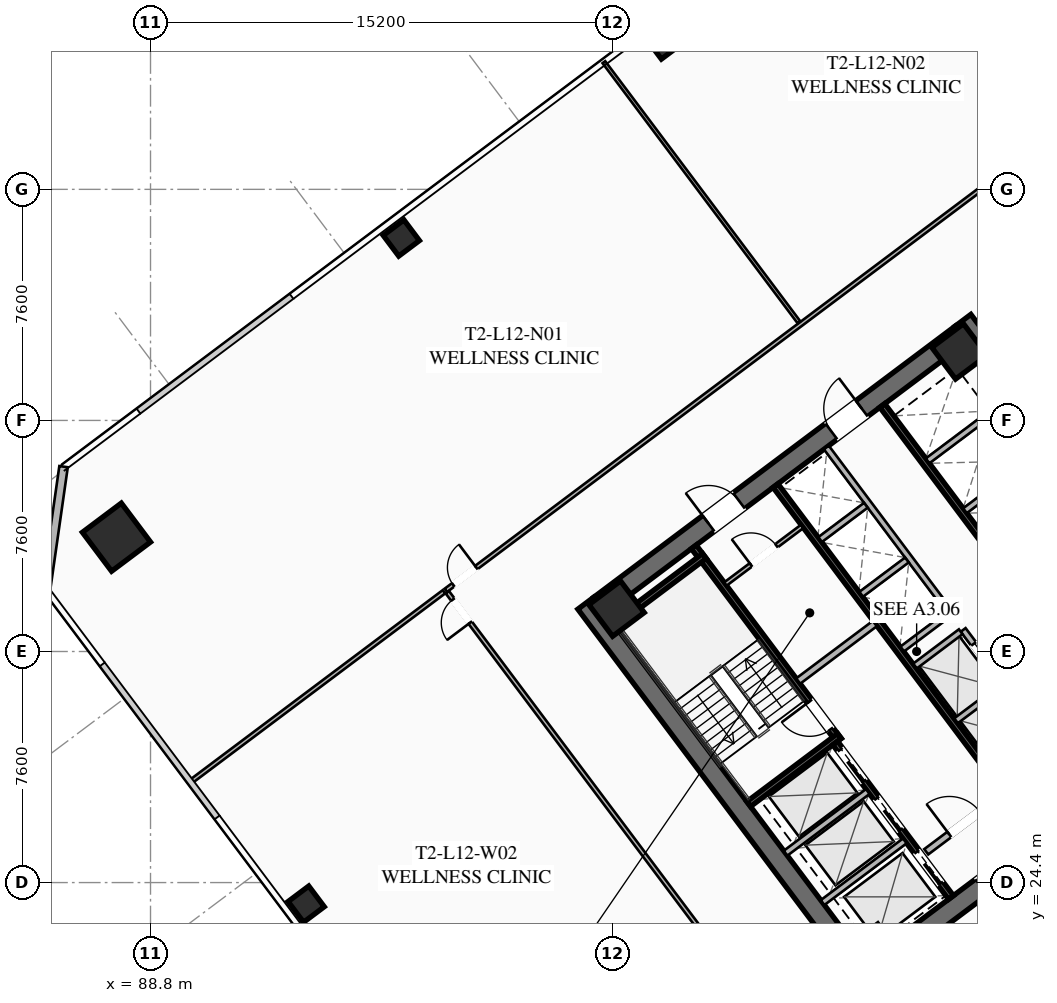
"""IFC4 building model, lengths in metres.
Left out: names, types, materials, properties, quantities, classifications, styles, units other than length and angle.
Written with IfcOpenShell. Run it as: python <this file> out.ifc"""

import sys

from ifc_helpers import new_model, si_unit, direction, frame, frame_2d, origin, origin_2d, place, context, subcontext, project, spatial, rectangle, hollow_rectangle, extrude, element, fill, save


model = new_model("IFC4")
c1 = context("Model", 3, precision=1e-05, world=origin(), true_north=direction((0.0, 1.0)))
c2 = subcontext(c1, "Body", "Model", "MODEL_VIEW")
j1 = project(units=[si_unit("LENGTHUNIT", "METRE"), si_unit("PLANEANGLEUNIT", "RADIAN")], contexts=[c1])
p1 = place(None, origin())
s1 = spatial("IfcSite", under=j1, at=p1, CompositionType="ELEMENT")
p2 = place(p1, origin())
s2 = spatial("IfcBuilding", under=s1, at=p2, CompositionType="ELEMENT")
p3 = place(p2, frame((0.0, 0.0, 49.45)))
s3 = spatial("IfcBuildingStorey", under=s2, at=p3, CompositionType="ELEMENT", Elevation=49.45)
for number, where, z_axis, x_axis in (
    (1, (112.476, 21.107, 0.0), (0.0, 0.0, 1.0), (-0.6, 0.8, 0.0)),
    (2, (115.524, 42.893, 0.0), (0.0, 0.0, 1.0), (0.6, -0.8, 0.0)),
):
    element("IfcWall", number, at=place(p3, frame(where, z_axis=z_axis, x_axis=x_axis)), inside=s3, PredefinedType="SHEAR", context=c2, shape_type="SweptSolid", body=[
        extrude(rectangle(XDim=15.6, YDim=0.65, at=frame_2d((7.8, 0.0))), origin(), (0.0, 0.0, 1.0), 3.55),
    ])
p4 = place(p3, frame((124.429, 30.478, 0.0), z_axis=(0.0, 0.0, 1.0), x_axis=(-0.799998028465, -0.600002628705, 0.0)))
e3 = element("IfcWall", 3, at=p4, inside=s3, PredefinedType="SHEAR", context=c2, shape_type="SweptSolid", body=[
    extrude(rectangle(XDim=14.86, YDim=0.65, at=frame_2d((7.43, 0.0))), origin(), (0.0, 0.0, 1.0), 3.55),
])
p5 = place(p4, frame((9.13, 0.0, 0.0)))
e4 = element("IfcOpeningElement", 4, at=p5, cuts=e3, PredefinedType="OPENING", context=c2, shape_type="SweptSolid", body=[
    extrude(rectangle(XDim=1.25, YDim=2.25, at=frame_2d((0.625, 1.125))), frame((0.0, 0.335, 0.0), z_axis=(0.0, -1.0, 0.0), x_axis=(1.0, 0.0, 0.0)), (0.0, 0.0, 1.0), 0.67),
])
p6 = place(p4, frame((4.08, 0.0, 0.0)))
e5 = element("IfcOpeningElement", 5, at=p6, cuts=e3, PredefinedType="OPENING", context=c2, shape_type="SweptSolid", body=[
    extrude(rectangle(XDim=1.25, YDim=2.25, at=frame_2d((0.625, 1.125))), frame((0.0, 0.335, 0.0), z_axis=(0.0, -1.0, 0.0), x_axis=(1.0, 0.0, 0.0)), (0.0, 0.0, 1.0), 0.67),
])
p7 = place(p3, frame((103.571, 33.522, 0.0), z_axis=(0.0, 0.0, 1.0), x_axis=(0.799998028465, 0.600002628705, 0.0)))
e6 = element("IfcWall", 6, at=p7, inside=s3, PredefinedType="SHEAR", context=c2, shape_type="SweptSolid", body=[
    extrude(rectangle(XDim=14.86, YDim=0.65, at=frame_2d((7.43, 0.0))), origin(), (0.0, 0.0, 1.0), 3.55),
])
p8 = place(p7, frame((4.48, 0.0, 0.0)))
e7 = element("IfcOpeningElement", 7, at=p8, cuts=e6, PredefinedType="OPENING", context=c2, shape_type="SweptSolid", body=[
    extrude(rectangle(XDim=1.25, YDim=2.25, at=frame_2d((0.625, 1.125))), frame((0.0, 0.335, 0.0), z_axis=(0.0, -1.0, 0.0), x_axis=(1.0, 0.0, 0.0)), (0.0, 0.0, 1.0), 0.67),
])
p9 = place(p7, frame((9.53, 0.0, 0.0)))
e8 = element("IfcOpeningElement", 8, at=p9, cuts=e6, PredefinedType="OPENING", context=c2, shape_type="SweptSolid", body=[
    extrude(rectangle(XDim=1.25, YDim=2.25, at=frame_2d((0.625, 1.125))), frame((0.0, 0.335, 0.0), z_axis=(0.0, -1.0, 0.0), x_axis=(1.0, 0.0, 0.0)), (0.0, 0.0, 1.0), 0.67),
])
for number, where, z_axis, x_axis in (
    (9, (115.41, 41.87, 0.0), (0.0, 0.0, 1.0), (0.8, 0.6, 0.0)),
    (10, (104.13, 33.41, 0.0), (0.0, 0.0, 1.0), (0.8, 0.6, 0.0)),
):
    element("IfcColumn", number, at=place(p3, frame(where, z_axis=z_axis, x_axis=x_axis)), inside=s3, PredefinedType="COLUMN", context=c2, shape_type="SweptSolid", body=[
        extrude(hollow_rectangle(XDim=1.3, YDim=1.3, WallThickness=0.05, at=origin_2d()), origin(), (0.0, 0.0, 1.0), 3.35),
    ])
p10 = place(p3, frame((87.68, 35.76, 0.0), z_axis=(0.0, 0.0, 1.0), x_axis=(0.799999996291, 0.600000004945, 0.0)))
e11 = element("IfcColumn", 11, at=p10, inside=s3, PredefinedType="COLUMN", context=c2, shape_type="SweptSolid", body=[
    extrude(hollow_rectangle(XDim=1.6, YDim=1.6, WallThickness=0.06, at=origin_2d()), origin(), (0.0, 0.0, 1.0), 3.35),
])
for number, where, z_axis, x_axis in (
    (12, (105.69, 52.08, 0.0), (0.0, 0.0, 1.0), (0.8, 0.6, 0.0)),
    (13, (97.05, 45.6, 0.0), (0.0, 0.0, 1.0), (0.8, 0.6, 0.0)),
    (14, (93.92, 23.69, 0.0), (0.0, 0.0, 1.0), (0.8, 0.6, 0.0)),
):
    element("IfcColumn", number, at=place(p3, frame(where, z_axis=z_axis, x_axis=x_axis)), inside=s3, PredefinedType="COLUMN", context=c2, shape_type="SweptSolid", body=[
        extrude(hollow_rectangle(XDim=0.85, YDim=0.85, WallThickness=0.035, at=origin_2d()), origin(), (0.0, 0.0, 1.0), 3.35),
    ])
p11 = place(p3, frame((85.36, 34.02, 0.0), z_axis=(0.0, 0.0, 1.0), x_axis=(0.14137968631, 0.989955445613, 0.0)))
e15 = element("IfcWall", 15, at=p11, inside=s3, PredefinedType="SOLIDWALL", context=c2, shape_type="SweptSolid", body=[
    extrude(rectangle(XDim=4.101, YDim=0.28, at=frame_2d((2.051, 0.0))), origin(), (0.0, 0.0, 1.0), 3.35),
])
p12 = place(p3, frame((111.44, 29.08, 0.0), z_axis=(0.0, 0.0, 1.0), x_axis=(-0.600009827119, 0.799992629566, 0.0)))
e16 = element("IfcWall", 16, at=p12, inside=s3, PredefinedType="SHEAR", context=c2, shape_type="SweptSolid", body=[
    extrude(rectangle(XDim=7.95, YDim=0.2, at=frame_2d((3.975, 0.0))), origin(), (0.0, 0.0, 1.0), 3.35),
])
p13 = place(p12, frame((0.45, 0.0, 0.0)))
e17 = element("IfcOpeningElement", 17, at=p13, cuts=e16, PredefinedType="OPENING", context=c2, shape_type="SweptSolid", body=[
    extrude(rectangle(XDim=1.15, YDim=2.2, at=frame_2d((0.575, 1.1))), frame((0.0, 0.11, 0.0), z_axis=(0.0, -1.0, 0.0), x_axis=(1.0, 0.0, 0.0)), (0.0, 0.0, 1.0), 0.22),
])
for number, where, z_axis, x_axis in (
    (18, (108.476, 26.982, 0.0), (0.0, 0.0, 1.0), (0.8, 0.6, 0.0)),
    (19, (104.036, 32.902, 0.0), (0.0, 0.0, 1.0), (0.8, 0.6, 0.0)),
):
    element("IfcWall", number, at=place(p3, frame(where, z_axis=z_axis, x_axis=x_axis)), inside=s3, PredefinedType="SHEAR", context=c2, shape_type="SweptSolid", body=[
        extrude(rectangle(XDim=3.73, YDim=0.2, at=frame_2d((1.865, 0.0))), origin(), (0.0, 0.0, 1.0), 3.35),
    ])
p14 = place(p3, frame((117.938, 26.016, 0.0), z_axis=(0.0, 0.0, 1.0), x_axis=(-0.600005463273, 0.799995902516, 0.0)))
e20 = element("IfcWall", 20, at=p14, inside=s3, PredefinedType="SHEAR", context=c2, shape_type="SweptSolid", body=[
    extrude(rectangle(XDim=14.3, YDim=0.2, at=frame_2d((7.15, 0.0))), origin(), (0.0, 0.0, 1.0), 3.35),
])
p15 = place(p3, frame((110.104, 31.028, 0.0), z_axis=(0.0, 0.0, 1.0), x_axis=(0.800018601094, 0.59997519774, 0.0)))
e21 = element("IfcWall", 21, at=p15, inside=s3, PredefinedType="SOLIDWALL", context=c2, shape_type="SweptSolid", body=[
    extrude(rectangle(XDim=3.15, YDim=0.22, at=frame_2d((1.575, 0.0))), origin(), (0.0, 0.0, 1.0), 2.703),
])
p16 = place(p3, frame((114.316, 25.412, 0.0), z_axis=(0.0, 0.0, 1.0), x_axis=(0.800018601094, 0.59997519774, 0.0)))
e22 = element("IfcWall", 22, at=p16, inside=s3, PredefinedType="SOLIDWALL", context=c2, shape_type="SweptSolid", body=[
    extrude(rectangle(XDim=3.15, YDim=0.22, at=frame_2d((1.575, 0.0))), origin(), (0.0, 0.0, 1.0), 2.703),
])
p17 = place(p16, frame((0.95, 0.0, 0.0)))
e23 = element("IfcOpeningElement", 23, at=p17, cuts=e22, PredefinedType="OPENING", context=c2, shape_type="SweptSolid", body=[
    extrude(rectangle(XDim=1.25, YDim=2.25, at=frame_2d((0.625, 1.125))), frame((0.0, 0.12, 0.0), z_axis=(0.0, -1.0, 0.0), x_axis=(1.0, 0.0, 0.0)), (0.0, 0.0, 1.0), 0.24),
])
p18 = place(p3, frame((115.13, 23.91, 0.0), z_axis=(0.0, 0.0, 1.0), x_axis=(-0.599975393228, 0.800018454488, 0.0)))
e24 = element("IfcWall", 24, at=p18, inside=s3, PredefinedType="SHEAR", context=c2, shape_type="SweptSolid", body=[
    extrude(rectangle(XDim=6.35, YDim=0.2, at=frame_2d((3.175, 0.0))), origin(), (0.0, 0.0, 1.0), 3.35),
])
p19 = place(p18, frame((4.775, 0.0, 0.0)))
e25 = element("IfcOpeningElement", 25, at=p19, cuts=e24, PredefinedType="OPENING", context=c2, shape_type="SweptSolid", body=[
    extrude(rectangle(XDim=1.3, YDim=2.25, at=frame_2d((0.65, 1.125))), frame((0.0, 0.11, 0.0), z_axis=(0.0, -1.0, 0.0), x_axis=(1.0, 0.0, 0.0)), (0.0, 0.0, 1.0), 0.22),
])
p20 = place(p18, frame((2.775, 0.0, 0.0)))
e26 = element("IfcOpeningElement", 26, at=p20, cuts=e24, PredefinedType="OPENING", context=c2, shape_type="SweptSolid", body=[
    extrude(rectangle(XDim=1.3, YDim=2.25, at=frame_2d((0.65, 1.125))), frame((0.0, 0.11, 0.0), z_axis=(0.0, -1.0, 0.0), x_axis=(1.0, 0.0, 0.0)), (0.0, 0.0, 1.0), 0.22),
])
p21 = place(p18, frame((0.575, 0.0, 0.0)))
e27 = element("IfcOpeningElement", 27, at=p21, cuts=e24, PredefinedType="OPENING", context=c2, shape_type="SweptSolid", body=[
    extrude(rectangle(XDim=1.3, YDim=2.25, at=frame_2d((0.65, 1.125))), frame((0.0, 0.11, 0.0), z_axis=(0.0, -1.0, 0.0), x_axis=(1.0, 0.0, 0.0)), (0.0, 0.0, 1.0), 0.22),
])
for number, where, z_axis, x_axis in (
    (28, (110.906, 23.742, 0.0), (0.0, 0.0, 1.0), (0.8, 0.6, 0.0)),
    (29, (109.688, 25.366, 0.0), (0.0, 0.0, 1.0), (0.8, 0.6, 0.0)),
):
    element("IfcWall", number, at=place(p3, frame(where, z_axis=z_axis, x_axis=x_axis)), inside=s3, PredefinedType="SOLIDWALL", context=c2, shape_type="SweptSolid", body=[
        extrude(rectangle(XDim=3.38, YDim=0.2, at=frame_2d((1.69, 0.0))), origin(), (0.0, 0.0, 1.0), 3.35),
    ])
p22 = place(p3, frame((112.87, 40.09, 0.0), z_axis=(0.0, 0.0, 1.0), x_axis=(0.599975393228, -0.800018454488, 0.0)))
e30 = element("IfcWall", 30, at=p22, inside=s3, PredefinedType="SHEAR", context=c2, shape_type="SweptSolid", body=[
    extrude(rectangle(XDim=6.35, YDim=0.2, at=frame_2d((3.175, 0.0))), origin(), (0.0, 0.0, 1.0), 3.35),
])
for number, where, z_axis, x_axis in (
    (31, (115.59, 36.63, 0.0), (0.0, 0.0, 1.0), (0.8, 0.6, 0.0)),
    (32, (114.36, 38.27, 0.0), (0.0, 0.0, 1.0), (0.8, 0.6, 0.0)),
):
    element("IfcWall", number, at=place(p3, frame(where, z_axis=z_axis, x_axis=x_axis)), inside=s3, PredefinedType="SOLIDWALL", context=c2, shape_type="SweptSolid", body=[
        extrude(rectangle(XDim=3.38, YDim=0.2, at=frame_2d((1.69, 0.0))), origin(), (0.0, 0.0, 1.0), 3.35),
    ])
p23 = place(p3, frame((107.71, 34.22, 0.0), z_axis=(0.0, 0.0, 1.0), x_axis=(0.799981399002, 0.60002480053, 0.0)))
e33 = element("IfcWall", 33, at=p23, inside=s3, PredefinedType="PARTITIONING", context=c2, shape_type="SweptSolid", body=[
    extrude(rectangle(XDim=3.15, YDim=0.135, at=frame_2d((1.575, 0.0))), origin(), (0.0, 0.0, 1.0), 2.703),
])
p24 = place(p23, frame((1.05, 0.0, 0.0)))
e34 = element("IfcOpeningElement", 34, at=p24, cuts=e33, PredefinedType="OPENING", context=c2, shape_type="SweptSolid", body=[
    extrude(rectangle(XDim=1.05, YDim=2.2, at=frame_2d((0.525, 1.1))), frame((0.0, 0.077, 0.0), z_axis=(0.0, -1.0, 0.0), x_axis=(1.0, 0.0, 0.0)), (0.0, 0.0, 1.0), 0.155),
])
p25 = place(p3, frame((119.61, 27.27, 0.0), z_axis=(0.0, 0.0, 1.0), x_axis=(-0.600011488909, 0.79999138319, 0.0)))
e35 = element("IfcWall", 35, at=p25, inside=s3, PredefinedType="SOLIDWALL", context=c2, shape_type="SweptSolid", body=[
    extrude(rectangle(XDim=6.8, YDim=0.2, at=frame_2d((3.4, 0.0))), origin(), (0.0, 0.0, 1.0), 3.35),
])
p26 = place(p25, frame((0.625, 0.0, 0.0)))
e36 = element("IfcOpeningElement", 36, at=p26, cuts=e35, PredefinedType="OPENING", context=c2, shape_type="SweptSolid", body=[
    extrude(rectangle(XDim=1.1, YDim=2.2, at=frame_2d((0.55, 1.1))), frame((0.0, 0.11, 0.0), z_axis=(0.0, -1.0, 0.0), x_axis=(1.0, 0.0, 0.0)), (0.0, 0.0, 1.0), 0.22),
])
p27 = place(p25, frame((2.875, 0.0, 0.0)))
e37 = element("IfcOpeningElement", 37, at=p27, cuts=e35, PredefinedType="OPENING", context=c2, shape_type="SweptSolid", body=[
    extrude(rectangle(XDim=1.1, YDim=2.2, at=frame_2d((0.55, 1.1))), frame((0.0, 0.11, 0.0), z_axis=(0.0, -1.0, 0.0), x_axis=(1.0, 0.0, 0.0)), (0.0, 0.0, 1.0), 0.22),
])
p28 = place(p25, frame((5.125, 0.0, 0.0)))
e38 = element("IfcOpeningElement", 38, at=p28, cuts=e35, PredefinedType="OPENING", context=c2, shape_type="SweptSolid", body=[
    extrude(rectangle(XDim=1.1, YDim=2.2, at=frame_2d((0.55, 1.1))), frame((0.0, 0.11, 0.0), z_axis=(0.0, -1.0, 0.0), x_axis=(1.0, 0.0, 0.0)), (0.0, 0.0, 1.0), 0.22),
])
p29 = place(p3, frame((115.296, 29.722, 0.0), z_axis=(0.0, 0.0, 1.0), x_axis=(0.799984418148, 0.600020775241, 0.0)))
e39 = element("IfcWall", 39, at=p29, inside=s3, PredefinedType="SOLIDWALL", context=c2, shape_type="SweptSolid", body=[
    extrude(rectangle(XDim=1.88, YDim=0.2, at=frame_2d((0.94, 0.0))), origin(), (0.0, 0.0, 1.0), 3.35),
])
p30 = place(p3, frame((113.946, 31.522, 0.0), z_axis=(0.0, 0.0, 1.0), x_axis=(0.8, 0.6, 0.0)))
e40 = element("IfcWall", 40, at=p30, inside=s3, PredefinedType="SOLIDWALL", context=c2, shape_type="SweptSolid", body=[
    extrude(rectangle(XDim=1.88, YDim=0.2, at=frame_2d((0.94, 0.0))), origin(), (0.0, 0.0, 1.0), 3.35),
])
p31 = place(p3, frame((115.11, 33.27, 0.0), z_axis=(0.0, 0.0, 1.0), x_axis=(-0.600011488909, 0.79999138319, 0.0)))
e41 = element("IfcWall", 41, at=p31, inside=s3, PredefinedType="SOLIDWALL", context=c2, shape_type="SweptSolid", body=[
    extrude(rectangle(XDim=6.8, YDim=0.2, at=frame_2d((3.4, 0.0))), origin(), (0.0, 0.0, 1.0), 3.35),
])
p32 = place(p3, frame((113.526, 32.082, 0.0), z_axis=(0.0, 0.0, 1.0), x_axis=(0.800046745961, 0.599937666993, 0.0)))
e42 = element("IfcWall", 42, at=p32, inside=s3, PredefinedType="SOLIDWALL", context=c2, shape_type="SweptSolid", body=[
    extrude(rectangle(XDim=1.88, YDim=0.2, at=frame_2d((0.94, 0.0))), origin(), (0.0, 0.0, 1.0), 3.35),
])
p33 = place(p3, frame((112.176, 33.882, 0.0), z_axis=(0.0, 0.0, 1.0), x_axis=(0.8, 0.6, 0.0)))
e43 = element("IfcWall", 43, at=p33, inside=s3, PredefinedType="SOLIDWALL", context=c2, shape_type="SweptSolid", body=[
    extrude(rectangle(XDim=1.88, YDim=0.2, at=frame_2d((0.94, 0.0))), origin(), (0.0, 0.0, 1.0), 3.35),
])
p34 = place(p3, frame((110.826, 35.682, 0.0), z_axis=(0.0, 0.0, 1.0), x_axis=(0.799984418148, 0.600020775241, 0.0)))
e44 = element("IfcWall", 44, at=p34, inside=s3, PredefinedType="SOLIDWALL", context=c2, shape_type="SweptSolid", body=[
    extrude(rectangle(XDim=1.88, YDim=0.2, at=frame_2d((0.94, 0.0))), origin(), (0.0, 0.0, 1.0), 3.35),
])
p35 = place(p3, frame((98.516, 34.012, 0.0), z_axis=(0.0, 0.0, 1.0), x_axis=(0.799998035726, 0.600002619023, 0.0)))
e45 = element("IfcWall", 45, at=p35, inside=s3, PredefinedType="PARTITIONING", context=c2, shape_type="SweptSolid", body=[
    extrude(rectangle(XDim=29.83, YDim=0.135, at=frame_2d((14.915, 0.0))), origin(), (0.0, 0.0, 1.0), 2.703),
])
p36 = place(p35, frame((0.3, 0.0, 0.0)))
e46 = element("IfcOpeningElement", 46, at=p36, cuts=e45, PredefinedType="OPENING", context=c2, shape_type="SweptSolid", body=[
    extrude(rectangle(XDim=0.95, YDim=2.05, at=frame_2d((0.475, 1.025))), frame((0.0, 0.077, 0.0), z_axis=(0.0, -1.0, 0.0), x_axis=(1.0, 0.0, 0.0)), (0.0, 0.0, 1.0), 0.155),
])
p37 = place(p35, frame((28.58, 0.0, 0.0)))
e47 = element("IfcOpeningElement", 47, at=p37, cuts=e45, PredefinedType="OPENING", context=c2, shape_type="SweptSolid", body=[
    extrude(rectangle(XDim=0.95, YDim=2.05, at=frame_2d((0.475, 1.025))), frame((0.0, 0.077, 0.0), z_axis=(0.0, -1.0, 0.0), x_axis=(1.0, 0.0, 0.0)), (0.0, 0.0, 1.0), 0.155),
])
p38 = place(p3, frame((110.132, 42.824, 0.0), z_axis=(0.0, 0.0, 1.0), x_axis=(-0.600007301277, 0.79999452399, 0.0)))
e48 = element("IfcWall", 48, at=p38, inside=s3, PredefinedType="PARTITIONING", context=c2, shape_type="SweptSolid", body=[
    extrude(rectangle(XDim=10.7, YDim=0.11, at=frame_2d((5.35, 0.0))), origin(), (0.0, 0.0, 1.0), 2.703),
])
p39 = place(p3, frame((135.46, 34.47, 0.0), z_axis=(0.0, 0.0, 1.0), x_axis=(-0.800000982127, -0.599998690494, 0.0)))
e49 = element("IfcWall", 49, at=p39, inside=s3, PredefinedType="PARTITIONING", context=c2, shape_type="SweptSolid", body=[
    extrude(rectangle(XDim=29.83, YDim=0.135, at=frame_2d((14.915, 0.0))), origin(), (0.0, 0.0, 1.0), 2.703),
])
p40 = place(p39, frame((28.5, 0.0, 0.0)))
e50 = element("IfcOpeningElement", 50, at=p40, cuts=e49, PredefinedType="OPENING", context=c2, shape_type="SweptSolid", body=[
    extrude(rectangle(XDim=0.95, YDim=2.05, at=frame_2d((0.475, 1.025))), frame((0.0, 0.077, 0.0), z_axis=(0.0, -1.0, 0.0), x_axis=(1.0, 0.0, 0.0)), (0.0, 0.0, 1.0), 0.155),
])
p41 = place(p39, frame((0.38, 0.0, 0.0)))
e51 = element("IfcOpeningElement", 51, at=p41, cuts=e49, PredefinedType="OPENING", context=c2, shape_type="SweptSolid", body=[
    extrude(rectangle(XDim=0.95, YDim=2.05, at=frame_2d((0.475, 1.025))), frame((0.0, 0.077, 0.0), z_axis=(0.0, -1.0, 0.0), x_axis=(1.0, 0.0, 0.0)), (0.0, 0.0, 1.0), 0.155),
])
p42 = place(p3, frame((111.548, 16.636, 0.0), z_axis=(0.0, 0.0, 1.0), x_axis=(-0.600003610192, 0.799997292343, 0.0)))
e52 = element("IfcWall", 52, at=p42, inside=s3, PredefinedType="PARTITIONING", context=c2, shape_type="SweptSolid", body=[
    extrude(rectangle(XDim=21.64, YDim=0.135, at=frame_2d((10.82, 0.0))), origin(), (0.0, 0.0, 1.0), 2.703),
])
p43 = place(p42, frame((0.3, 0.0, 0.0)))
e53 = element("IfcOpeningElement", 53, at=p43, cuts=e52, PredefinedType="OPENING", context=c2, shape_type="SweptSolid", body=[
    extrude(rectangle(XDim=0.95, YDim=2.05, at=frame_2d((0.475, 1.025))), frame((0.0, 0.077, 0.0), z_axis=(0.0, -1.0, 0.0), x_axis=(1.0, 0.0, 0.0)), (0.0, 0.0, 1.0), 0.155),
])
p44 = place(p42, frame((20.39, 0.0, 0.0)))
e54 = element("IfcOpeningElement", 54, at=p44, cuts=e52, PredefinedType="OPENING", context=c2, shape_type="SweptSolid", body=[
    extrude(rectangle(XDim=0.95, YDim=2.05, at=frame_2d((0.475, 1.025))), frame((0.0, 0.077, 0.0), z_axis=(0.0, -1.0, 0.0), x_axis=(1.0, 0.0, 0.0)), (0.0, 0.0, 1.0), 0.155),
])
p45 = place(p3, frame((98.452, 33.964, 0.0), z_axis=(0.0, 0.0, 1.0), x_axis=(-0.799988753532, -0.600014994998, 0.0)))
e55 = element("IfcWall", 55, at=p45, inside=s3, PredefinedType="PARTITIONING", context=c2, shape_type="SweptSolid", body=[
    extrude(rectangle(XDim=10.42, YDim=0.135, at=frame_2d((5.21, 0.0))), origin(), (0.0, 0.0, 1.0), 2.703),
])
p46 = place(p8, origin())
e56 = element("IfcDoor", 56, at=p46, inside=s3, OperationType="SINGLE_SWING_LEFT", PredefinedType="DOOR", context=c2, shape_type="SweptSolid", body=[
    extrude(rectangle(XDim=1.25, YDim=2.25, at=frame_2d((0.625, 1.125))), frame((0.0, 0.025, 0.0), z_axis=(0.0, -1.0, 0.0), x_axis=(1.0, 0.0, 0.0)), (0.0, 0.0, 1.0), 0.05),
])
fill(e7, e56)
p47 = place(p9, origin())
e57 = element("IfcDoor", 57, at=p47, inside=s3, OperationType="SINGLE_SWING_RIGHT", PredefinedType="DOOR", context=c2, shape_type="SweptSolid", body=[
    extrude(rectangle(XDim=1.25, YDim=2.25, at=frame_2d((0.625, 1.125))), frame((0.0, 0.025, 0.0), z_axis=(0.0, -1.0, 0.0), x_axis=(1.0, 0.0, 0.0)), (0.0, 0.0, 1.0), 0.05),
])
fill(e8, e57)
p48 = place(p13, origin())
e58 = element("IfcDoor", 58, at=p48, inside=s3, OperationType="SINGLE_SWING_RIGHT", PredefinedType="DOOR", context=c2, shape_type="SweptSolid", body=[
    extrude(rectangle(XDim=1.15, YDim=2.2, at=frame_2d((0.575, 1.1))), frame((0.0, 0.025, 0.0), z_axis=(0.0, -1.0, 0.0), x_axis=(1.0, 0.0, 0.0)), (0.0, 0.0, 1.0), 0.05),
])
fill(e17, e58)
p49 = place(p17, origin())
e59 = element("IfcDoor", 59, at=p49, inside=s3, OperationType="SINGLE_SWING_LEFT", PredefinedType="DOOR", context=c2, shape_type="SweptSolid", body=[
    extrude(rectangle(XDim=1.25, YDim=2.25, at=frame_2d((0.625, 1.125))), frame((0.0, 0.025, 0.0), z_axis=(0.0, -1.0, 0.0), x_axis=(1.0, 0.0, 0.0)), (0.0, 0.0, 1.0), 0.05),
])
fill(e23, e59)
p50 = place(p24, origin())
e60 = element("IfcDoor", 60, at=p50, inside=s3, OperationType="SINGLE_SWING_LEFT", PredefinedType="DOOR", context=c2, shape_type="SweptSolid", body=[
    extrude(rectangle(XDim=1.05, YDim=2.2, at=frame_2d((0.525, 1.1))), frame((0.0, 0.025, 0.0), z_axis=(0.0, -1.0, 0.0), x_axis=(1.0, 0.0, 0.0)), (0.0, 0.0, 1.0), 0.05),
])
fill(e34, e60)
p51 = place(p36, origin())
e61 = element("IfcDoor", 61, at=p51, inside=s3, OperationType="SINGLE_SWING_RIGHT", PredefinedType="DOOR", context=c2, shape_type="SweptSolid", body=[
    extrude(rectangle(XDim=0.95, YDim=2.05, at=frame_2d((0.475, 1.025))), frame((0.0, 0.025, 0.0), z_axis=(0.0, -1.0, 0.0), x_axis=(1.0, 0.0, 0.0)), (0.0, 0.0, 1.0), 0.05),
])
fill(e46, e61)
p52 = place(p44, origin())
e62 = element("IfcDoor", 62, at=p52, inside=s3, OperationType="SINGLE_SWING_LEFT", PredefinedType="DOOR", context=c2, shape_type="SweptSolid", body=[
    extrude(rectangle(XDim=0.95, YDim=2.05, at=frame_2d((0.475, 1.025))), frame((0.0, 0.025, 0.0), z_axis=(0.0, -1.0, 0.0), x_axis=(1.0, 0.0, 0.0)), (0.0, 0.0, 1.0), 0.05),
])
fill(e54, e62)
p53 = place(p19, origin())
e63 = element("IfcDoor", 63, at=p53, inside=s3, OperationType="SLIDING_TO_LEFT", PredefinedType="DOOR", context=c2, shape_type="SweptSolid", body=[
    extrude(rectangle(XDim=1.3, YDim=2.25, at=frame_2d((0.65, 1.125))), frame((0.0, 0.025, 0.0), z_axis=(0.0, -1.0, 0.0), x_axis=(1.0, 0.0, 0.0)), (0.0, 0.0, 1.0), 0.05),
])
fill(e25, e63)
p54 = place(p20, origin())
e64 = element("IfcDoor", 64, at=p54, inside=s3, OperationType="SLIDING_TO_LEFT", PredefinedType="DOOR", context=c2, shape_type="SweptSolid", body=[
    extrude(rectangle(XDim=1.3, YDim=2.25, at=frame_2d((0.65, 1.125))), frame((0.0, 0.025, 0.0), z_axis=(0.0, -1.0, 0.0), x_axis=(1.0, 0.0, 0.0)), (0.0, 0.0, 1.0), 0.05),
])
fill(e26, e64)
p55 = place(p21, origin())
e65 = element("IfcDoor", 65, at=p55, inside=s3, OperationType="SLIDING_TO_LEFT", PredefinedType="DOOR", context=c2, shape_type="SweptSolid", body=[
    extrude(rectangle(XDim=1.3, YDim=2.25, at=frame_2d((0.65, 1.125))), frame((0.0, 0.025, 0.0), z_axis=(0.0, -1.0, 0.0), x_axis=(1.0, 0.0, 0.0)), (0.0, 0.0, 1.0), 0.05),
])
fill(e27, e65)
p56 = place(p28, origin())
e66 = element("IfcDoor", 66, at=p56, inside=s3, OperationType="SLIDING_TO_LEFT", PredefinedType="DOOR", context=c2, shape_type="SweptSolid", body=[
    extrude(rectangle(XDim=1.1, YDim=2.2, at=frame_2d((0.55, 1.1))), frame((0.0, 0.025, 0.0), z_axis=(0.0, -1.0, 0.0), x_axis=(1.0, 0.0, 0.0)), (0.0, 0.0, 1.0), 0.05),
])
fill(e38, e66)
save(model, sys.argv[1])
